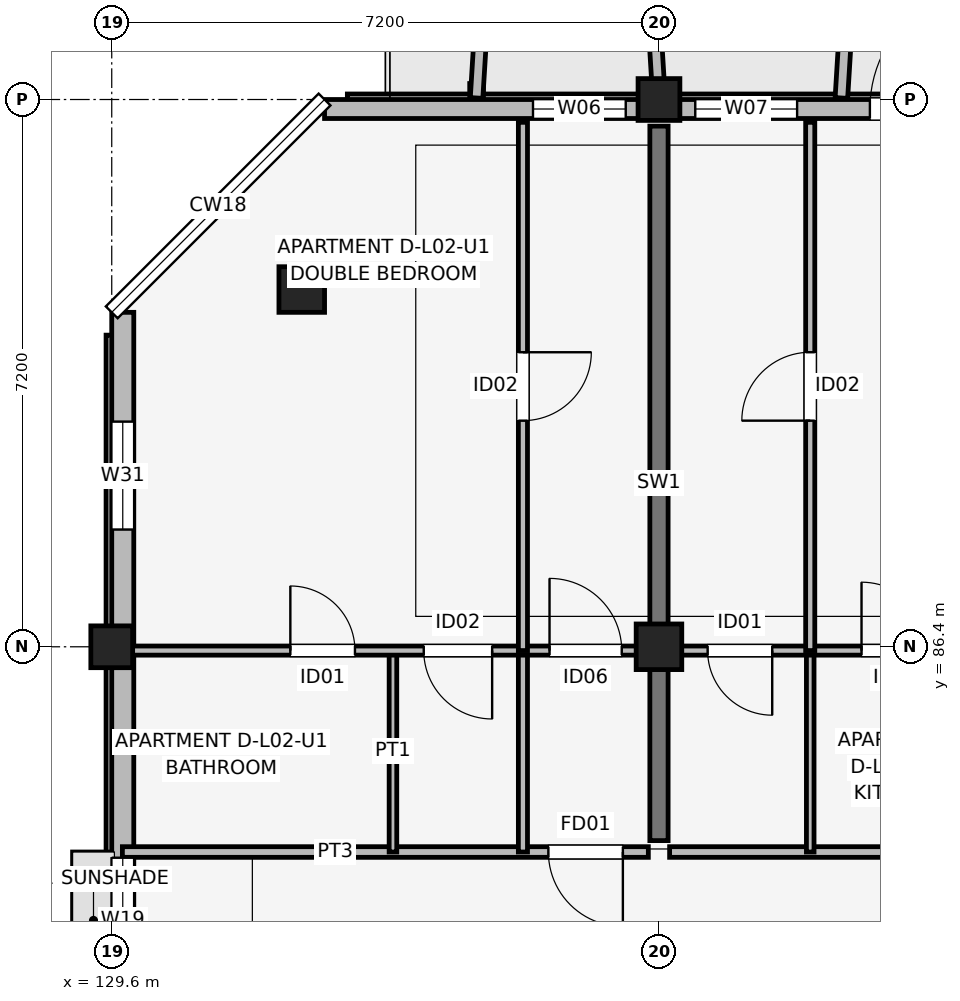
"""IFC4 building model, lengths in metres.
Left out: names, types, materials, properties, quantities, classifications, styles, units other than length and angle.
Written with IfcOpenShell. Run it as: python <this file> out.ifc"""

import sys

from ifc_helpers import new_model, si_unit, direction, frame, frame_2d, origin, origin_2d, place, context, subcontext, project, spatial, rectangle, extrude, element, fill, save


model = new_model("IFC4")
c1 = context("Model", 3, precision=1e-05, world=origin(), true_north=direction((0.0, 1.0)))
c2 = subcontext(c1, "Body", "Model", "MODEL_VIEW")
j1 = project(units=[si_unit("LENGTHUNIT", "METRE"), si_unit("PLANEANGLEUNIT", "RADIAN")], contexts=[c1])
p1 = place(None, origin())
s1 = spatial("IfcSite", under=j1, at=p1, CompositionType="ELEMENT")
p2 = place(p1, origin())
s2 = spatial("IfcBuilding", under=s1, at=p2, CompositionType="ELEMENT")
p3 = place(p2, frame((0.0, 0.0, 8.7)))
s3 = spatial("IfcBuildingStorey", under=s2, at=p3, CompositionType="ELEMENT", Elevation=8.7)
p4 = place(p3, frame((129.6, 86.4, 0.0), z_axis=(0.0, 0.0, 1.0), x_axis=(1.0, 0.0, 0.0)))
e1 = element("IfcColumn", 1, at=p4, inside=s3, PredefinedType="COLUMN", context=c2, shape_type="SweptSolid", body=[
    extrude(rectangle(XDim=0.55, YDim=0.55, at=origin_2d()), origin(), (0.0, 0.0, 1.0), 3.15),
])
for number, where, z_axis, x_axis in (
    (2, (132.1, 91.1, 0.0), (0.0, 0.0, 1.0), (1.0, 0.0, 0.0)),
    (3, (136.8, 86.4, 0.0), (0.0, 0.0, 1.0), (1.0, 0.0, 0.0)),
):
    element("IfcColumn", number, at=place(p3, frame(where, z_axis=z_axis, x_axis=x_axis)), inside=s3, PredefinedType="COLUMN", context=c2, shape_type="SweptSolid", body=[
        extrude(rectangle(XDim=0.6, YDim=0.6, at=origin_2d()), origin(), (0.0, 0.0, 1.0), 3.15),
    ])
p5 = place(p3, frame((136.8, 93.6, 0.0), z_axis=(0.0, 0.0, 1.0), x_axis=(1.0, 0.0, 0.0)))
e4 = element("IfcColumn", 4, at=p5, inside=s3, PredefinedType="COLUMN", context=c2, shape_type="SweptSolid", body=[
    extrude(rectangle(XDim=0.55, YDim=0.55, at=origin_2d()), origin(), (0.0, 0.0, 1.0), 3.15),
])
p6 = place(p3, frame((136.8, 83.85, 0.0), z_axis=(0.0, 0.0, 1.0), x_axis=(0.0, 1.0, 0.0)))
e5 = element("IfcWall", 5, at=p6, inside=s3, PredefinedType="SHEAR", context=c2, shape_type="SweptSolid", body=[
    extrude(rectangle(XDim=9.4, YDim=0.24, at=frame_2d((4.7, 0.0))), origin(), (0.0, 0.0, 1.0), 3.15),
])
p7 = place(p3, frame((162.8, 93.475, 0.0), z_axis=(0.0, 0.0, 1.0), x_axis=(-1.0, 0.0, 0.0)))
e6 = element("IfcWall", 6, at=p7, inside=s3, PredefinedType="SOLIDWALL", context=c2, shape_type="SweptSolid", body=[
    extrude(rectangle(XDim=30.4, YDim=0.25, at=frame_2d((15.2, 0.0))), origin(), (0.0, 0.0, 1.0), 2.43),
])
p8 = place(p7, frame((23.225, 0.0, 0.0), z_axis=(0.0, 0.0, 1.0), x_axis=(-1.0, 0.0, 0.0)))
e7 = element("IfcOpeningElement", 7, at=p8, cuts=e6, PredefinedType="OPENING", context=c2, shape_type="SweptSolid", body=[
    extrude(rectangle(XDim=1.65, YDim=2.15, at=frame_2d((0.825, 1.075))), frame((0.0, 0.135, 0.0), z_axis=(0.0, -1.0, 0.0), x_axis=(1.0, 0.0, 0.0)), (0.0, 0.0, 1.0), 0.27),
])
p9 = place(p7, frame((8.75, 0.0, 0.0), z_axis=(0.0, 0.0, 1.0), x_axis=(-1.0, 0.0, 0.0)))
e8 = element("IfcOpeningElement", 8, at=p9, cuts=e6, PredefinedType="OPENING", context=c2, shape_type="SweptSolid", body=[
    extrude(rectangle(XDim=1.5, YDim=2.15, at=frame_2d((0.75, 1.075))), frame((0.0, 0.135, 0.0), z_axis=(0.0, -1.0, 0.0), x_axis=(1.0, 0.0, 0.0)), (0.0, 0.0, 1.0), 0.27),
])
p10 = place(p7, frame((26.438, 0.0, 0.75)))
e9 = element("IfcOpeningElement", 9, at=p10, cuts=e6, PredefinedType="OPENING", context=c2, shape_type="SweptSolid", body=[
    extrude(rectangle(XDim=1.22, YDim=1.5, at=frame_2d((0.61, 0.75))), frame((0.0, 0.135, 0.0), z_axis=(0.0, -1.0, 0.0), x_axis=(1.0, 0.0, 0.0)), (0.0, 0.0, 1.0), 0.27),
])
p11 = place(p7, frame((24.183, 0.0, 0.75)))
e10 = element("IfcOpeningElement", 10, at=p11, cuts=e6, PredefinedType="OPENING", context=c2, shape_type="SweptSolid", body=[
    extrude(rectangle(XDim=1.34, YDim=1.55, at=frame_2d((0.67, 0.775))), frame((0.0, 0.135, 0.0), z_axis=(0.0, -1.0, 0.0), x_axis=(1.0, 0.0, 0.0)), (0.0, 0.0, 1.0), 0.27),
])
p12 = place(p7, frame((16.798, 0.0, 0.75)))
e11 = element("IfcOpeningElement", 11, at=p12, cuts=e6, PredefinedType="OPENING", context=c2, shape_type="SweptSolid", body=[
    extrude(rectangle(XDim=1.46, YDim=1.55, at=frame_2d((0.73, 0.775))), frame((0.0, 0.135, 0.0), z_axis=(0.0, -1.0, 0.0), x_axis=(1.0, 0.0, 0.0)), (0.0, 0.0, 1.0), 0.27),
])
p13 = place(p7, frame((14.34, 0.0, 0.7)))
e12 = element("IfcOpeningElement", 12, at=p13, cuts=e6, PredefinedType="OPENING", context=c2, shape_type="SweptSolid", body=[
    extrude(rectangle(XDim=1.72, YDim=1.6, at=frame_2d((0.86, 0.8))), frame((0.0, 0.135, 0.0), z_axis=(0.0, -1.0, 0.0), x_axis=(1.0, 0.0, 0.0)), (0.0, 0.0, 1.0), 0.27),
])
p14 = place(p7, frame((9.968, 0.0, 0.75)))
e13 = element("IfcOpeningElement", 13, at=p14, cuts=e6, PredefinedType="OPENING", context=c2, shape_type="SweptSolid", body=[
    extrude(rectangle(XDim=0.72, YDim=1.35, at=frame_2d((0.36, 0.675))), frame((0.0, 0.135, 0.0), z_axis=(0.0, -1.0, 0.0), x_axis=(1.0, 0.0, 0.0)), (0.0, 0.0, 1.0), 0.27),
])
p15 = place(p7, frame((2.183, 0.0, 0.7)))
e14 = element("IfcOpeningElement", 14, at=p15, cuts=e6, PredefinedType="OPENING", context=c2, shape_type="SweptSolid", body=[
    extrude(rectangle(XDim=1.72, YDim=1.6, at=frame_2d((0.86, 0.8))), frame((0.0, 0.135, 0.0), z_axis=(0.0, -1.0, 0.0), x_axis=(1.0, 0.0, 0.0)), (0.0, 0.0, 1.0), 0.27),
])
p16 = place(p3, frame((129.745, 90.8, 0.0), z_axis=(0.0, 0.0, 1.0), x_axis=(0.0, -1.0, 0.0)))
e15 = element("IfcWall", 15, at=p16, inside=s3, PredefinedType="SOLIDWALL", context=c2, shape_type="SweptSolid", body=[
    extrude(rectangle(XDim=16.0, YDim=0.29, at=frame_2d((8.0, 0.0))), origin(), (0.0, 0.0, 1.0), 2.38),
])
p17 = place(p16, frame((7.175, 0.0, 1.05)))
e16 = element("IfcOpeningElement", 16, at=p17, cuts=e15, PredefinedType="OPENING", context=c2, shape_type="SweptSolid", body=[
    extrude(rectangle(XDim=1.65, YDim=1.15, at=frame_2d((0.825, 0.575))), frame((0.0, 0.155, 0.0), z_axis=(0.0, -1.0, 0.0), x_axis=(1.0, 0.0, 0.0)), (0.0, 0.0, 1.0), 0.31),
])
p18 = place(p16, frame((1.438, 0.0, 0.67)))
e17 = element("IfcOpeningElement", 17, at=p18, cuts=e15, PredefinedType="OPENING", context=c2, shape_type="SweptSolid", body=[
    extrude(rectangle(XDim=1.42, YDim=1.6, at=frame_2d((0.71, 0.8))), frame((0.0, 0.155, 0.0), z_axis=(0.0, -1.0, 0.0), x_axis=(1.0, 0.0, 0.0)), (0.0, 0.0, 1.0), 0.31),
])
for number, where, z_axis, x_axis in (
    (18, (134.4, 93.62, 0.0), (0.0, 0.0, 1.0), (0.061, 0.998, 0.0)),
    (19, (136.8, 93.62, 0.0), (0.0, 0.0, 1.0), (-0.061, 0.998, 0.0)),
):
    element("IfcWall", number, at=place(p3, frame(where, z_axis=z_axis, x_axis=x_axis)), inside=s3, PredefinedType="ELEMENTEDWALL", context=c2, shape_type="SweptSolid", body=[
        extrude(rectangle(XDim=1.964, YDim=0.165, at=frame_2d((0.982, 0.0))), origin(), (0.0, 0.0, 1.0), 2.95),
    ])
p19 = place(p3, frame((139.2, 93.62, 0.0), z_axis=(0.0, 0.0, 1.0), x_axis=(0.061170732449, 0.998127317276, 0.0)))
e20 = element("IfcWall", 20, at=p19, inside=s3, PredefinedType="ELEMENTEDWALL", context=c2, shape_type="SweptSolid", body=[
    extrude(rectangle(XDim=1.964, YDim=0.165, at=frame_2d((0.982, 0.0))), origin(), (0.0, 0.0, 1.0), 2.53),
])
p20 = place(p3, frame((129.74, 83.7, 0.0), z_axis=(0.0, 0.0, 1.0), x_axis=(1.0, 0.0, 0.0)))
e21 = element("IfcWall", 21, at=p20, inside=s3, PredefinedType="PARTITIONING", context=c2, shape_type="SweptSolid", body=[
    extrude(rectangle(XDim=6.92, YDim=0.14, at=frame_2d((3.46, 0.0))), origin(), (0.0, 0.0, 1.0), 2.38),
])
p21 = place(p20, frame((6.585, 0.0, 0.0), z_axis=(0.0, 0.0, 1.0), x_axis=(-1.0, 0.0, 0.0)))
e22 = element("IfcOpeningElement", 22, at=p21, cuts=e21, PredefinedType="OPENING", context=c2, shape_type="SweptSolid", body=[
    extrude(rectangle(XDim=0.98, YDim=2.1, at=frame_2d((0.49, 1.05))), frame((0.0, 0.08, 0.0), z_axis=(0.0, -1.0, 0.0), x_axis=(1.0, 0.0, 0.0)), (0.0, 0.0, 1.0), 0.16),
])
p22 = place(p3, frame((133.3, 83.7, 0.0), z_axis=(0.0, 0.0, 1.0), x_axis=(0.0, 1.0, 0.0)))
e23 = element("IfcWall", 23, at=p22, inside=s3, PredefinedType="PARTITIONING", context=c2, shape_type="SweptSolid", body=[
    extrude(rectangle(XDim=2.65, YDim=0.1, at=frame_2d((1.325, 0.0))), origin(), (0.0, 0.0, 1.0), 2.375),
])
p23 = place(p3, frame((135.01, 83.7, 0.0), z_axis=(0.0, 0.0, 1.0), x_axis=(0.0, 1.0, 0.0)))
e24 = element("IfcWall", 24, at=p23, inside=s3, PredefinedType="PARTITIONING", context=c2, shape_type="SweptSolid", body=[
    extrude(rectangle(XDim=2.65, YDim=0.12, at=frame_2d((1.325, 0.0))), origin(), (0.0, 0.0, 1.0), 2.375),
])
p24 = place(p3, frame((129.74, 86.35, 0.0), z_axis=(0.0, 0.0, 1.0), x_axis=(1.0, 0.0, 0.0)))
e25 = element("IfcWall", 25, at=p24, inside=s3, PredefinedType="PARTITIONING", context=c2, shape_type="SweptSolid", body=[
    extrude(rectangle(XDim=6.92, YDim=0.12, at=frame_2d((3.46, 0.0))), origin(), (0.0, 0.0, 1.0), 2.375),
])
p25 = place(p24, frame((2.21, 0.0, 0.0)))
e26 = element("IfcOpeningElement", 26, at=p25, cuts=e25, PredefinedType="OPENING", context=c2, shape_type="SweptSolid", body=[
    extrude(rectangle(XDim=0.85, YDim=2.08, at=frame_2d((0.425, 1.04))), frame((0.0, 0.07, 0.0), z_axis=(0.0, -1.0, 0.0), x_axis=(1.0, 0.0, 0.0)), (0.0, 0.0, 1.0), 0.14),
])
p26 = place(p24, frame((4.865, 0.0, 0.0), z_axis=(0.0, 0.0, 1.0), x_axis=(-1.0, 0.0, 0.0)))
e27 = element("IfcOpeningElement", 27, at=p26, cuts=e25, PredefinedType="OPENING", context=c2, shape_type="SweptSolid", body=[
    extrude(rectangle(XDim=0.9, YDim=2.08, at=frame_2d((0.45, 1.04))), frame((0.0, 0.07, 0.0), z_axis=(0.0, -1.0, 0.0), x_axis=(1.0, 0.0, 0.0)), (0.0, 0.0, 1.0), 0.14),
])
p27 = place(p24, frame((5.62, 0.0, 0.0)))
e28 = element("IfcOpeningElement", 28, at=p27, cuts=e25, PredefinedType="OPENING", context=c2, shape_type="SweptSolid", body=[
    extrude(rectangle(XDim=0.95, YDim=2.08, at=frame_2d((0.475, 1.04))), frame((0.0, 0.07, 0.0), z_axis=(0.0, -1.0, 0.0), x_axis=(1.0, 0.0, 0.0)), (0.0, 0.0, 1.0), 0.14),
])
p28 = place(p3, frame((135.01, 86.35, 0.0), z_axis=(0.0, 0.0, 1.0), x_axis=(0.0, 1.0, 0.0)))
e29 = element("IfcWall", 29, at=p28, inside=s3, PredefinedType="PARTITIONING", context=c2, shape_type="SweptSolid", body=[
    extrude(rectangle(XDim=6.95, YDim=0.12, at=frame_2d((3.475, 0.0))), origin(), (0.0, 0.0, 1.0), 2.375),
])
p29 = place(p28, frame((3.925, 0.0, 0.0), z_axis=(0.0, 0.0, 1.0), x_axis=(-1.0, 0.0, 0.0)))
e30 = element("IfcOpeningElement", 30, at=p29, cuts=e29, PredefinedType="OPENING", context=c2, shape_type="SweptSolid", body=[
    extrude(rectangle(XDim=0.9, YDim=2.08, at=frame_2d((0.45, 1.04))), frame((0.0, 0.07, 0.0), z_axis=(0.0, -1.0, 0.0), x_axis=(1.0, 0.0, 0.0)), (0.0, 0.0, 1.0), 0.14),
])
p30 = place(p3, frame((136.94, 83.7, 0.0), z_axis=(0.0, 0.0, 1.0), x_axis=(1.0, 0.0, 0.0)))
e31 = element("IfcWall", 31, at=p30, inside=s3, PredefinedType="PARTITIONING", context=c2, shape_type="SweptSolid", body=[
    extrude(rectangle(XDim=6.92, YDim=0.14, at=frame_2d((3.46, 0.0))), origin(), (0.0, 0.0, 1.0), 2.38),
])
p31 = place(p30, frame((5.02, 0.0, 0.0)))
e32 = element("IfcOpeningElement", 32, at=p31, cuts=e31, PredefinedType="OPENING", context=c2, shape_type="SweptSolid", body=[
    extrude(rectangle(XDim=0.98, YDim=2.1, at=frame_2d((0.49, 1.05))), frame((0.0, 0.08, 0.0), z_axis=(0.0, -1.0, 0.0), x_axis=(1.0, 0.0, 0.0)), (0.0, 0.0, 1.0), 0.16),
])
p32 = place(p3, frame((138.79, 83.7, 0.0), z_axis=(0.0, 0.0, 1.0), x_axis=(0.0, 1.0, 0.0)))
e33 = element("IfcWall", 33, at=p32, inside=s3, PredefinedType="PARTITIONING", context=c2, shape_type="SweptSolid", body=[
    extrude(rectangle(XDim=2.65, YDim=0.1, at=frame_2d((1.325, 0.0))), origin(), (0.0, 0.0, 1.0), 2.375),
])
p33 = place(p3, frame((136.94, 86.35, 0.0), z_axis=(0.0, 0.0, 1.0), x_axis=(1.0, 0.0, 0.0)))
e34 = element("IfcWall", 34, at=p33, inside=s3, PredefinedType="PARTITIONING", context=c2, shape_type="SweptSolid", body=[
    extrude(rectangle(XDim=6.92, YDim=0.12, at=frame_2d((3.46, 0.0))), origin(), (0.0, 0.0, 1.0), 2.375),
])
p34 = place(p33, frame((1.35, 0.0, 0.0), z_axis=(0.0, 0.0, 1.0), x_axis=(-1.0, 0.0, 0.0)))
e35 = element("IfcOpeningElement", 35, at=p34, cuts=e34, PredefinedType="OPENING", context=c2, shape_type="SweptSolid", body=[
    extrude(rectangle(XDim=0.85, YDim=2.08, at=frame_2d((0.425, 1.04))), frame((0.0, 0.07, 0.0), z_axis=(0.0, -1.0, 0.0), x_axis=(1.0, 0.0, 0.0)), (0.0, 0.0, 1.0), 0.14),
])
p35 = place(p33, frame((2.525, 0.0, 0.0)))
e36 = element("IfcOpeningElement", 36, at=p35, cuts=e34, PredefinedType="OPENING", context=c2, shape_type="SweptSolid", body=[
    extrude(rectangle(XDim=0.9, YDim=2.08, at=frame_2d((0.45, 1.04))), frame((0.0, 0.07, 0.0), z_axis=(0.0, -1.0, 0.0), x_axis=(1.0, 0.0, 0.0)), (0.0, 0.0, 1.0), 0.14),
])
p36 = place(p33, frame((5.985, 0.0, 0.0), z_axis=(0.0, 0.0, 1.0), x_axis=(-1.0, 0.0, 0.0)))
e37 = element("IfcOpeningElement", 37, at=p36, cuts=e34, PredefinedType="OPENING", context=c2, shape_type="SweptSolid", body=[
    extrude(rectangle(XDim=0.95, YDim=2.08, at=frame_2d((0.475, 1.04))), frame((0.0, 0.07, 0.0), z_axis=(0.0, -1.0, 0.0), x_axis=(1.0, 0.0, 0.0)), (0.0, 0.0, 1.0), 0.14),
])
p37 = place(p3, frame((138.79, 86.35, 0.0), z_axis=(0.0, 0.0, 1.0), x_axis=(0.0, 1.0, 0.0)))
e38 = element("IfcWall", 38, at=p37, inside=s3, PredefinedType="PARTITIONING", context=c2, shape_type="SweptSolid", body=[
    extrude(rectangle(XDim=6.95, YDim=0.12, at=frame_2d((3.475, 0.0))), origin(), (0.0, 0.0, 1.0), 2.375),
])
p38 = place(p37, frame((3.025, 0.0, 0.0)))
e39 = element("IfcOpeningElement", 39, at=p38, cuts=e38, PredefinedType="OPENING", context=c2, shape_type="SweptSolid", body=[
    extrude(rectangle(XDim=0.9, YDim=2.08, at=frame_2d((0.45, 1.04))), frame((0.0, 0.07, 0.0), z_axis=(0.0, -1.0, 0.0), x_axis=(1.0, 0.0, 0.0)), (0.0, 0.0, 1.0), 0.14),
])
p39 = place(p8, origin())
e40 = element("IfcDoor", 40, at=p39, inside=s3, OperationType="SINGLE_SWING_LEFT", PredefinedType="DOOR", context=c2, shape_type="SweptSolid", body=[
    extrude(rectangle(XDim=1.65, YDim=2.15, at=frame_2d((0.825, 1.075))), frame((0.0, 0.025, 0.0), z_axis=(0.0, -1.0, 0.0), x_axis=(1.0, 0.0, 0.0)), (0.0, 0.0, 1.0), 0.05),
])
fill(e7, e40)
p40 = place(p10, origin())
e41 = element("IfcWindow", 41, at=p40, inside=s3, PartitioningType="SINGLE_PANEL", PredefinedType="WINDOW", context=c2, shape_type="SweptSolid", body=[
    extrude(rectangle(XDim=1.22, YDim=1.5, at=frame_2d((0.61, 0.75))), frame((0.0, 0.03, 0.0), z_axis=(0.0, -1.0, 0.0), x_axis=(1.0, 0.0, 0.0)), (0.0, 0.0, 1.0), 0.06),
])
fill(e9, e41)
p41 = place(p11, origin())
e42 = element("IfcWindow", 42, at=p41, inside=s3, PartitioningType="SINGLE_PANEL", PredefinedType="WINDOW", context=c2, shape_type="SweptSolid", body=[
    extrude(rectangle(XDim=1.34, YDim=1.55, at=frame_2d((0.67, 0.775))), frame((0.0, 0.03, 0.0), z_axis=(0.0, -1.0, 0.0), x_axis=(1.0, 0.0, 0.0)), (0.0, 0.0, 1.0), 0.06),
])
fill(e10, e42)
p42 = place(p17, origin())
e43 = element("IfcWindow", 43, at=p42, inside=s3, PartitioningType="SINGLE_PANEL", PredefinedType="WINDOW", context=c2, shape_type="SweptSolid", body=[
    extrude(rectangle(XDim=1.65, YDim=1.15, at=frame_2d((0.825, 0.575))), frame((0.0, 0.03, 0.0), z_axis=(0.0, -1.0, 0.0), x_axis=(1.0, 0.0, 0.0)), (0.0, 0.0, 1.0), 0.06),
])
fill(e16, e43)
p43 = place(p18, origin())
e44 = element("IfcWindow", 44, at=p43, inside=s3, PartitioningType="SINGLE_PANEL", PredefinedType="WINDOW", context=c2, shape_type="SweptSolid", body=[
    extrude(rectangle(XDim=1.42, YDim=1.6, at=frame_2d((0.71, 0.8))), frame((0.0, 0.03, 0.0), z_axis=(0.0, -1.0, 0.0), x_axis=(1.0, 0.0, 0.0)), (0.0, 0.0, 1.0), 0.06),
])
fill(e17, e44)
p44 = place(p21, origin())
e45 = element("IfcDoor", 45, at=p44, inside=s3, OperationType="SINGLE_SWING_RIGHT", PredefinedType="DOOR", context=c2, shape_type="SweptSolid", body=[
    extrude(rectangle(XDim=0.98, YDim=2.1, at=frame_2d((0.49, 1.05))), frame((0.0, 0.025, 0.0), z_axis=(0.0, -1.0, 0.0), x_axis=(1.0, 0.0, 0.0)), (0.0, 0.0, 1.0), 0.05),
])
fill(e22, e45)
p45 = place(p25, origin())
e46 = element("IfcDoor", 46, at=p45, inside=s3, OperationType="SINGLE_SWING_LEFT", PredefinedType="DOOR", context=c2, shape_type="SweptSolid", body=[
    extrude(rectangle(XDim=0.85, YDim=2.08, at=frame_2d((0.425, 1.04))), frame((0.0, 0.025, 0.0), z_axis=(0.0, -1.0, 0.0), x_axis=(1.0, 0.0, 0.0)), (0.0, 0.0, 1.0), 0.05),
])
fill(e26, e46)
p46 = place(p26, origin())
e47 = element("IfcDoor", 47, at=p46, inside=s3, OperationType="SINGLE_SWING_RIGHT", PredefinedType="DOOR", context=c2, shape_type="SweptSolid", body=[
    extrude(rectangle(XDim=0.9, YDim=2.08, at=frame_2d((0.45, 1.04))), frame((0.0, 0.025, 0.0), z_axis=(0.0, -1.0, 0.0), x_axis=(1.0, 0.0, 0.0)), (0.0, 0.0, 1.0), 0.05),
])
fill(e27, e47)
p47 = place(p27, origin())
e48 = element("IfcDoor", 48, at=p47, inside=s3, OperationType="SINGLE_SWING_LEFT", PredefinedType="DOOR", context=c2, shape_type="SweptSolid", body=[
    extrude(rectangle(XDim=0.95, YDim=2.08, at=frame_2d((0.475, 1.04))), frame((0.0, 0.025, 0.0), z_axis=(0.0, -1.0, 0.0), x_axis=(1.0, 0.0, 0.0)), (0.0, 0.0, 1.0), 0.05),
])
fill(e28, e48)
p48 = place(p29, origin())
e49 = element("IfcDoor", 49, at=p48, inside=s3, OperationType="SINGLE_SWING_RIGHT", PredefinedType="DOOR", context=c2, shape_type="SweptSolid", body=[
    extrude(rectangle(XDim=0.9, YDim=2.08, at=frame_2d((0.45, 1.04))), frame((0.0, 0.025, 0.0), z_axis=(0.0, -1.0, 0.0), x_axis=(1.0, 0.0, 0.0)), (0.0, 0.0, 1.0), 0.05),
])
fill(e30, e49)
p49 = place(p34, origin())
e50 = element("IfcDoor", 50, at=p49, inside=s3, OperationType="SINGLE_SWING_RIGHT", PredefinedType="DOOR", context=c2, shape_type="SweptSolid", body=[
    extrude(rectangle(XDim=0.85, YDim=2.08, at=frame_2d((0.425, 1.04))), frame((0.0, 0.025, 0.0), z_axis=(0.0, -1.0, 0.0), x_axis=(1.0, 0.0, 0.0)), (0.0, 0.0, 1.0), 0.05),
])
fill(e35, e50)
p50 = place(p35, origin())
e51 = element("IfcDoor", 51, at=p50, inside=s3, OperationType="SINGLE_SWING_LEFT", PredefinedType="DOOR", context=c2, shape_type="SweptSolid", body=[
    extrude(rectangle(XDim=0.9, YDim=2.08, at=frame_2d((0.45, 1.04))), frame((0.0, 0.025, 0.0), z_axis=(0.0, -1.0, 0.0), x_axis=(1.0, 0.0, 0.0)), (0.0, 0.0, 1.0), 0.05),
])
fill(e36, e51)
p51 = place(p38, origin())
e52 = element("IfcDoor", 52, at=p51, inside=s3, OperationType="SINGLE_SWING_LEFT", PredefinedType="DOOR", context=c2, shape_type="SweptSolid", body=[
    extrude(rectangle(XDim=0.9, YDim=2.08, at=frame_2d((0.45, 1.04))), frame((0.0, 0.025, 0.0), z_axis=(0.0, -1.0, 0.0), x_axis=(1.0, 0.0, 0.0)), (0.0, 0.0, 1.0), 0.05),
])
fill(e39, e52)
save(model, sys.argv[1])
